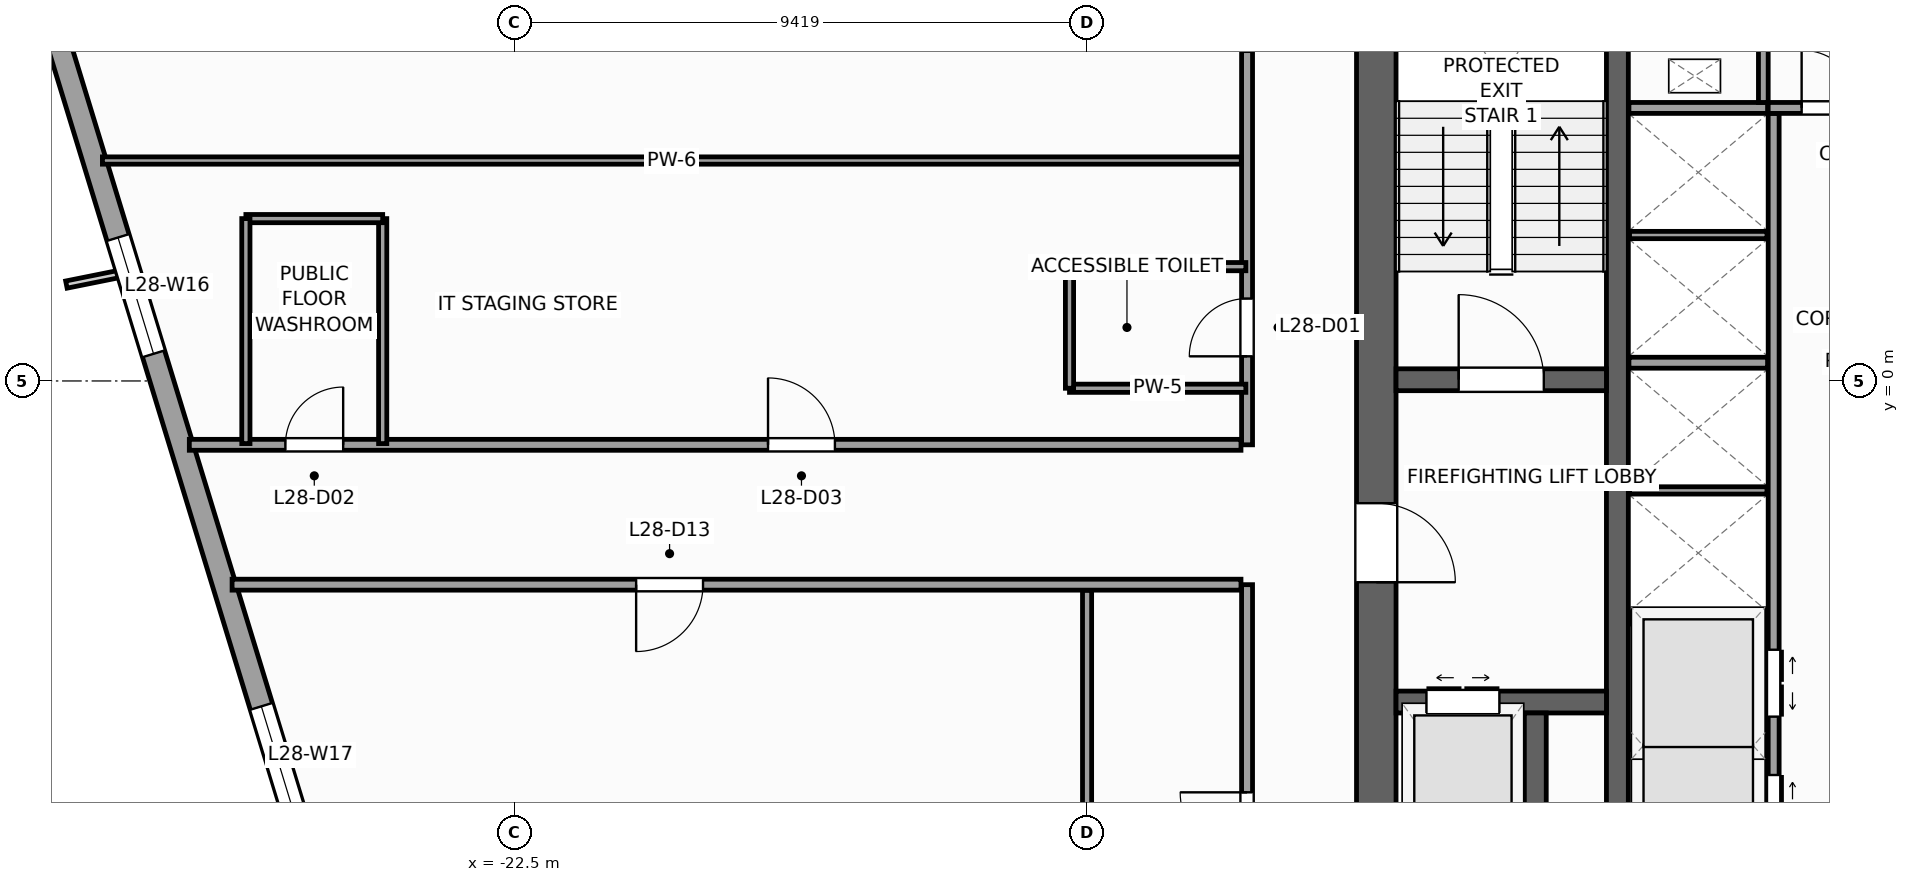
"""IFC4 building model, lengths in metres.
Left out: names, types, materials, properties, quantities, classifications, styles, units other than length and angle.
Written with IfcOpenShell. Run it as: python <this file> out.ifc"""

import sys

from ifc_helpers import new_model, si_unit, direction, frame, frame_2d, origin, place, context, subcontext, project, spatial, rectangle, extrude, source, transform, mapped, element, fill, save


model = new_model("IFC4")
c1 = context("Model", 3, precision=1e-05, world=origin(), true_north=direction((0.0, 1.0)))
c2 = subcontext(c1, "Body", "Model", "MODEL_VIEW")
j1 = project(units=[si_unit("LENGTHUNIT", "METRE"), si_unit("PLANEANGLEUNIT", "RADIAN")], contexts=[c1])
p1 = place(None, origin())
s1 = spatial("IfcSite", under=j1, at=p1, CompositionType="ELEMENT")
p2 = place(p1, origin())
s2 = spatial("IfcBuilding", under=s1, at=p2, CompositionType="ELEMENT")
p3 = place(p2, frame((0.0, 0.0, 119.2)))
s3 = spatial("IfcBuildingStorey", under=s2, at=p3, CompositionType="ELEMENT", Elevation=119.2)
p4 = place(p3, frame((-8.325, -8.0, 0.0), z_axis=(0.0, 0.0, 1.0), x_axis=(0.0, 1.0, 0.0)))
e1 = element("IfcWall", 1, at=p4, inside=s3, PredefinedType="SHEAR", context=c2, shape_type="SweptSolid", body=[
    extrude(rectangle(XDim=16.0, YDim=0.65, at=frame_2d((8.0, 0.0))), origin(), (0.0, 0.0, 1.0), 4.0),
])
p5 = place(p4, frame((4.69, 0.0, 0.0)))
e2 = element("IfcOpeningElement", 2, at=p5, cuts=e1, PredefinedType="OPENING", context=c2, shape_type="SweptSolid", body=[
    extrude(rectangle(XDim=1.3, YDim=2.2, at=frame_2d((0.65, 1.1))), frame((0.0, 0.335, 0.0), z_axis=(0.0, -1.0, 0.0), x_axis=(1.0, 0.0, 0.0)), (0.0, 0.0, 1.0), 0.67),
])
p6 = place(p3, frame((-4.36, -8.0, 0.0), z_axis=(0.0, 0.0, 1.0), x_axis=(0.0, 1.0, 0.0)))
e3 = element("IfcWall", 3, at=p6, inside=s3, PredefinedType="SHEAR", context=c2, shape_type="SweptSolid", body=[
    extrude(rectangle(XDim=16.0, YDim=0.36, at=frame_2d((8.0, 0.0))), origin(), (0.0, 0.0, 1.0), 4.0),
])
p7 = place(p3, frame((-8.0, 0.02, 0.0), z_axis=(0.0, 0.0, 1.0), x_axis=(1.0, 0.0, 0.0)))
e4 = element("IfcWall", 4, at=p7, inside=s3, PredefinedType="SHEAR", context=c2, shape_type="SweptSolid", body=[
    extrude(rectangle(XDim=3.46, YDim=0.36, at=frame_2d((1.73, 0.0))), origin(), (0.0, 0.0, 1.0), 4.0),
])
p8 = place(p7, frame((1.03, 0.0, 0.0)))
e5 = element("IfcOpeningElement", 5, at=p8, cuts=e4, PredefinedType="OPENING", context=c2, shape_type="SweptSolid", body=[
    extrude(rectangle(XDim=1.4, YDim=2.2, at=frame_2d((0.7, 1.1))), frame((0.0, 0.19, 0.0), z_axis=(0.0, -1.0, 0.0), x_axis=(1.0, 0.0, 0.0)), (0.0, 0.0, 1.0), 0.38),
])
p9 = place(p3, frame((-8.0, -5.28, 0.0), z_axis=(0.0, 0.0, 1.0), x_axis=(1.0, 0.0, 0.0)))
e6 = element("IfcWall", 6, at=p9, inside=s3, PredefinedType="SHEAR", context=c2, shape_type="SweptSolid", body=[
    extrude(rectangle(XDim=3.46, YDim=0.36, at=frame_2d((1.73, 0.0))), origin(), (0.0, 0.0, 1.0), 4.0),
])
p10 = place(p9, frame((0.5, 0.0, 0.0)))
e7 = element("IfcOpeningElement", 7, at=p10, cuts=e6, PredefinedType="OPENING", context=c2, shape_type="SweptSolid", body=[
    extrude(rectangle(XDim=1.2, YDim=2.25, at=frame_2d((0.6, 1.125))), frame((0.0, 0.19, 0.0), z_axis=(0.0, -1.0, 0.0), x_axis=(1.0, 0.0, 0.0)), (0.0, 0.0, 1.0), 0.38),
])
p11 = place(p3, frame((-5.71, -8.0, 0.0), z_axis=(0.0, 0.0, 1.0), x_axis=(0.0, 1.0, 0.0)))
e8 = element("IfcWall", 8, at=p11, inside=s3, PredefinedType="SHEAR", context=c2, shape_type="SweptSolid", body=[
    extrude(rectangle(XDim=2.54, YDim=0.36, at=frame_2d((1.27, 0.0))), origin(), (0.0, 0.0, 1.0), 4.0),
])
p12 = place(p3, frame((-32.658, 14.265, 0.0), z_axis=(0.0, 0.0, 1.0), x_axis=(0.292373127906, -0.956304320851, 0.0)))
e9 = element("IfcWall", 9, at=p12, inside=s3, PredefinedType="STANDARD", context=c2, shape_type="SweptSolid", body=[
    extrude(rectangle(XDim=46.38, YDim=0.38, at=frame_2d((23.19, 0.0))), origin(), (0.0, 0.0, 1.0), 3.14),
])
p13 = place(p12, frame((28.265, 0.0, 0.0)))
e10 = element("IfcOpeningElement", 10, at=p13, cuts=e9, PredefinedType="OPENING", context=c2, shape_type="SweptSolid", body=[
    extrude(rectangle(XDim=1.05, YDim=2.25, at=frame_2d((0.525, 1.125))), frame((0.0, 0.2, 0.0), z_axis=(0.0, -1.0, 0.0), x_axis=(1.0, 0.0, 0.0)), (0.0, 0.0, 1.0), 0.4),
])
p14 = place(p12, frame((4.865, 0.0, 0.51)))
e11 = element("IfcOpeningElement", 11, at=p14, cuts=e9, PredefinedType="OPENING", context=c2, shape_type="SweptSolid", body=[
    extrude(rectangle(XDim=1.4, YDim=2.4, at=frame_2d((0.7, 1.2))), frame((0.0, 0.2, 0.0), z_axis=(0.0, -1.0, 0.0), x_axis=(1.0, 0.0, 0.0)), (0.0, 0.0, 1.0), 0.4),
])
p15 = place(p12, frame((12.45, 0.0, 0.51)))
e12 = element("IfcOpeningElement", 12, at=p15, cuts=e9, PredefinedType="OPENING", context=c2, shape_type="SweptSolid", body=[
    extrude(rectangle(XDim=2.0, YDim=2.4, at=frame_2d((1.0, 1.2))), frame((0.0, 0.2, 0.0), z_axis=(0.0, -1.0, 0.0), x_axis=(1.0, 0.0, 0.0)), (0.0, 0.0, 1.0), 0.4),
])
p16 = place(p12, frame((20.512, 0.0, 0.51)))
e13 = element("IfcOpeningElement", 13, at=p16, cuts=e9, PredefinedType="OPENING", context=c2, shape_type="SweptSolid", body=[
    extrude(rectangle(XDim=2.0, YDim=2.4, at=frame_2d((1.0, 1.2))), frame((0.0, 0.2, 0.0), z_axis=(0.0, -1.0, 0.0), x_axis=(1.0, 0.0, 0.0)), (0.0, 0.0, 1.0), 0.4),
])
p17 = place(p12, frame((30.538, 0.0, 0.51)))
e14 = element("IfcOpeningElement", 14, at=p17, cuts=e9, PredefinedType="OPENING", context=c2, shape_type="SweptSolid", body=[
    extrude(rectangle(XDim=2.0, YDim=2.4, at=frame_2d((1.0, 1.2))), frame((0.0, 0.2, 0.0), z_axis=(0.0, -1.0, 0.0), x_axis=(1.0, 0.0, 0.0)), (0.0, 0.0, 1.0), 0.4),
])
p18 = place(p12, frame((39.187, 0.0, 0.51)))
e15 = element("IfcOpeningElement", 15, at=p18, cuts=e9, PredefinedType="OPENING", context=c2, shape_type="SweptSolid", body=[
    extrude(rectangle(XDim=1.4, YDim=2.4, at=frame_2d((0.7, 1.2))), frame((0.0, 0.2, 0.0), z_axis=(0.0, -1.0, 0.0), x_axis=(1.0, 0.0, 0.0)), (0.0, 0.0, 1.0), 0.4),
])
p19 = place(p3, frame((-1.79, -7.98, 0.0), z_axis=(0.0, 0.0, 1.0), x_axis=(0.0, 1.0, 0.0)))
e16 = element("IfcWall", 16, at=p19, inside=s3, PredefinedType="PARTITIONING", context=c2, shape_type="SweptSolid", body=[
    extrude(rectangle(XDim=12.38, YDim=0.18, at=frame_2d((6.19, 0.0))), origin(), (0.0, 0.0, 1.0), 3.74),
])
p20 = place(p19, frame((0.4, 0.0, 0.0)))
e17 = element("IfcOpeningElement", 17, at=p20, cuts=e16, PredefinedType="OPENING", context=c2, shape_type="SweptSolid", body=[
    extrude(rectangle(XDim=1.1, YDim=2.2, at=frame_2d((0.55, 1.1))), frame((0.0, 0.1, 0.0), z_axis=(0.0, -1.0, 0.0), x_axis=(1.0, 0.0, 0.0)), (0.0, 0.0, 1.0), 0.2),
])
p21 = place(p19, frame((2.46, 0.0, 0.0)))
e18 = element("IfcOpeningElement", 18, at=p21, cuts=e16, PredefinedType="OPENING", context=c2, shape_type="SweptSolid", body=[
    extrude(rectangle(XDim=1.1, YDim=2.2, at=frame_2d((0.55, 1.1))), frame((0.0, 0.1, 0.0), z_axis=(0.0, -1.0, 0.0), x_axis=(1.0, 0.0, 0.0)), (0.0, 0.0, 1.0), 0.2),
])
p22 = place(p3, frame((-1.88, 4.49, 0.0), z_axis=(0.0, 0.0, 1.0), x_axis=(1.0, 0.0, 0.0)))
e19 = element("IfcWall", 19, at=p22, inside=s3, PredefinedType="PARTITIONING", context=c2, shape_type="SweptSolid", body=[
    extrude(rectangle(XDim=3.76, YDim=0.18, at=frame_2d((1.88, 0.0))), origin(), (0.0, 0.0, 1.0), 3.74),
])
p23 = place(p22, frame((0.55, 0.0, 0.0)))
e20 = element("IfcOpeningElement", 20, at=p23, cuts=e19, PredefinedType="OPENING", context=c2, shape_type="SweptSolid", body=[
    extrude(rectangle(XDim=0.95, YDim=2.1, at=frame_2d((0.475, 1.05))), frame((0.0, 0.1, 0.0), z_axis=(0.0, -1.0, 0.0), x_axis=(1.0, 0.0, 0.0)), (0.0, 0.0, 1.0), 0.2),
])
p24 = place(p22, frame((2.56, 0.0, 0.0)))
e21 = element("IfcOpeningElement", 21, at=p24, cuts=e19, PredefinedType="OPENING", context=c2, shape_type="SweptSolid", body=[
    extrude(rectangle(XDim=0.88, YDim=2.1, at=frame_2d((0.44, 1.05))), frame((0.0, 0.1, 0.0), z_axis=(0.0, -1.0, 0.0), x_axis=(1.0, 0.0, 0.0)), (0.0, 0.0, 1.0), 0.2),
])
for number, where, z_axis, x_axis in (
    (22, (-4.17, -3.9, 0.0), (0.0, 0.0, 1.0), (1.0, 0.0, 0.0)),
    (23, (-4.17, 0.3, 0.0), (0.0, 0.0, 1.0), (1.0, 0.0, 0.0)),
    (24, (-4.17, 4.49, 0.0), (0.0, 0.0, 1.0), (1.0, 0.0, 0.0)),
):
    element("IfcWall", number, at=place(p3, frame(where, z_axis=z_axis, x_axis=x_axis)), inside=s3, PredefinedType="PARTITIONING", context=c2, shape_type="SweptSolid", body=[
        extrude(rectangle(XDim=2.28, YDim=0.18, at=frame_2d((1.14, 0.0))), origin(), (0.0, 0.0, 1.0), 3.74),
    ])
for number, where, z_axis, x_axis in (
    (25, (-4.16, -6.0, 0.0), (0.0, 0.0, 1.0), (1.0, 0.0, 0.0)),
    (26, (-4.16, -1.8, 0.0), (0.0, 0.0, 1.0), (1.0, 0.0, 0.0)),
    (27, (-4.16, 2.4, 0.0), (0.0, 0.0, 1.0), (1.0, 0.0, 0.0)),
):
    element("IfcWall", number, at=place(p3, frame(where, z_axis=z_axis, x_axis=x_axis)), inside=s3, PredefinedType="PARTITIONING", context=c2, shape_type="SweptSolid", body=[
        extrude(rectangle(XDim=2.26, YDim=0.12, at=frame_2d((1.13, 0.0))), origin(), (0.0, 0.0, 1.0), 3.74),
    ])
p25 = place(p3, frame((-1.96, 4.58, 0.0), z_axis=(0.0, 0.0, 1.0), x_axis=(0.0, 1.0, 0.0)))
e28 = element("IfcWall", 28, at=p25, inside=s3, PredefinedType="PARTITIONING", context=c2, shape_type="SweptSolid", body=[
    extrude(rectangle(XDim=3.4, YDim=0.16, at=frame_2d((1.7, 0.0))), origin(), (0.0, 0.0, 1.0), 3.74),
])
p26 = place(p3, frame((-10.45, -12.6, 0.0), z_axis=(0.0, 0.0, 1.0), x_axis=(0.0, 1.0, 0.0)))
e29 = element("IfcWall", 29, at=p26, inside=s3, PredefinedType="PARTITIONING", context=c2, shape_type="SweptSolid", body=[
    extrude(rectangle(XDim=9.25, YDim=0.18, at=frame_2d((4.625, 0.0))), origin(), (0.0, 0.0, 1.0), 3.74),
])
p27 = place(p26, frame((4.735, 0.0, 0.0)))
e30 = element("IfcOpeningElement", 30, at=p27, cuts=e29, PredefinedType="OPENING", context=c2, shape_type="SweptSolid", body=[
    extrude(rectangle(XDim=1.1, YDim=2.2, at=frame_2d((0.55, 1.1))), frame((0.0, 0.1, 0.0), z_axis=(0.0, -1.0, 0.0), x_axis=(1.0, 0.0, 0.0)), (0.0, 0.0, 1.0), 0.2),
])
p28 = place(p3, frame((-10.45, -1.05, 0.0), z_axis=(0.0, 0.0, 1.0), x_axis=(0.0, 1.0, 0.0)))
e31 = element("IfcWall", 31, at=p28, inside=s3, PredefinedType="PARTITIONING", context=c2, shape_type="SweptSolid", body=[
    extrude(rectangle(XDim=13.65, YDim=0.18, at=frame_2d((6.825, 0.0))), origin(), (0.0, 0.0, 1.0), 3.74),
])
p29 = place(p28, frame((1.455, 0.0, 0.0)))
e32 = element("IfcOpeningElement", 32, at=p29, cuts=e31, PredefinedType="OPENING", context=c2, shape_type="SweptSolid", body=[
    extrude(rectangle(XDim=0.95, YDim=2.1, at=frame_2d((0.475, 1.05))), frame((0.0, 0.1, 0.0), z_axis=(0.0, -1.0, 0.0), x_axis=(1.0, 0.0, 0.0)), (0.0, 0.0, 1.0), 0.2),
])
p30 = place(p28, frame((6.462, 0.0, 0.0)))
e33 = element("IfcOpeningElement", 33, at=p30, cuts=e31, PredefinedType="OPENING", context=c2, shape_type="SweptSolid", body=[
    extrude(rectangle(XDim=1.1, YDim=2.2, at=frame_2d((0.55, 1.1))), frame((0.0, 0.1, 0.0), z_axis=(0.0, -1.0, 0.0), x_axis=(1.0, 0.0, 0.0)), (0.0, 0.0, 1.0), 0.2),
])
p31 = place(p3, frame((-27.142, -3.35, 0.0), z_axis=(0.0, 0.0, 1.0), x_axis=(1.0, 0.0, 0.0)))
e34 = element("IfcWall", 34, at=p31, inside=s3, PredefinedType="PARTITIONING", context=c2, shape_type="SweptSolid", body=[
    extrude(rectangle(XDim=16.592, YDim=0.18, at=frame_2d((8.296, 0.0))), origin(), (0.0, 0.0, 1.0), 3.74),
])
p32 = place(p31, frame((6.645, 0.0, 0.0)))
e35 = element("IfcOpeningElement", 35, at=p32, cuts=e34, PredefinedType="OPENING", context=c2, shape_type="SweptSolid", body=[
    extrude(rectangle(XDim=1.1, YDim=2.2, at=frame_2d((0.55, 1.1))), frame((0.0, 0.1, 0.0), z_axis=(0.0, -1.0, 0.0), x_axis=(1.0, 0.0, 0.0)), (0.0, 0.0, 1.0), 0.2),
])
p33 = place(p3, frame((-27.845, -1.05, 0.0), z_axis=(0.0, 0.0, 1.0), x_axis=(1.0, 0.0, 0.0)))
e36 = element("IfcWall", 36, at=p33, inside=s3, PredefinedType="PARTITIONING", context=c2, shape_type="SweptSolid", body=[
    extrude(rectangle(XDim=17.295, YDim=0.18, at=frame_2d((8.647, 0.0))), origin(), (0.0, 0.0, 1.0), 3.74),
])
p34 = place(p33, frame((1.58, 0.0, 0.0)))
e37 = element("IfcOpeningElement", 37, at=p34, cuts=e36, PredefinedType="OPENING", context=c2, shape_type="SweptSolid", body=[
    extrude(rectangle(XDim=0.95, YDim=2.1, at=frame_2d((0.475, 1.05))), frame((0.0, 0.1, 0.0), z_axis=(0.0, -1.0, 0.0), x_axis=(1.0, 0.0, 0.0)), (0.0, 0.0, 1.0), 0.2),
])
p35 = place(p33, frame((9.517, 0.0, 0.0)))
e38 = element("IfcOpeningElement", 38, at=p35, cuts=e36, PredefinedType="OPENING", context=c2, shape_type="SweptSolid", body=[
    extrude(rectangle(XDim=1.1, YDim=2.2, at=frame_2d((0.55, 1.1))), frame((0.0, 0.1, 0.0), z_axis=(0.0, -1.0, 0.0), x_axis=(1.0, 0.0, 0.0)), (0.0, 0.0, 1.0), 0.2),
])
p36 = place(p3, frame((-29.274, 3.625, 0.0), z_axis=(0.0, 0.0, 1.0), x_axis=(1.0, 0.0, 0.0)))
e39 = element("IfcWall", 39, at=p36, inside=s3, PredefinedType="PARTITIONING", context=c2, shape_type="SweptSolid", body=[
    extrude(rectangle(XDim=18.729, YDim=0.12, at=frame_2d((9.365, 0.0))), origin(), (0.0, 0.0, 1.0), 3.74),
])
p37 = place(p3, frame((-13.081, -32.165, 0.0), z_axis=(0.0, 0.0, 1.0), x_axis=(0.0, 1.0, 0.0)))
e40 = element("IfcWall", 40, at=p37, inside=s3, PredefinedType="PARTITIONING", context=c2, shape_type="SweptSolid", body=[
    extrude(rectangle(XDim=28.72, YDim=0.15, at=frame_2d((14.36, 0.0))), origin(), (0.0, 0.0, 1.0), 2.732),
])
for number, where, z_axis, x_axis in (
    (41, (-13.37, -0.12, 0.0), (0.0, 0.0, 1.0), (1.0, 0.0, 0.0)),
    (42, (-13.37, 1.88, 0.0), (0.0, 0.0, 1.0), (1.0, 0.0, 0.0)),
):
    element("IfcWall", number, at=place(p3, frame(where, z_axis=z_axis, x_axis=x_axis)), inside=s3, PredefinedType="PARTITIONING", context=c2, shape_type="SweptSolid", body=[
        extrude(rectangle(XDim=2.9, YDim=0.135, at=frame_2d((1.45, 0.0))), origin(), (0.0, 0.0, 1.0), 3.74),
    ])
p38 = place(p3, frame((-13.37, -0.12, 0.0), z_axis=(0.0, 0.0, 1.0), x_axis=(0.0, 1.0, 0.0)))
e43 = element("IfcWall", 43, at=p38, inside=s3, PredefinedType="PARTITIONING", context=c2, shape_type="SweptSolid", body=[
    extrude(rectangle(XDim=2.0, YDim=0.135, at=frame_2d((1.0, 0.0))), origin(), (0.0, 0.0, 1.0), 2.732),
])
p39 = place(p3, frame((-24.665, -1.03, 0.0), z_axis=(0.0, 0.0, 1.0), x_axis=(0.0, 1.0, 0.0)))
e44 = element("IfcWall", 44, at=p39, inside=s3, PredefinedType="PARTITIONING", context=c2, shape_type="SweptSolid", body=[
    extrude(rectangle(XDim=3.7, YDim=0.135, at=frame_2d((1.85, 0.0))), origin(), (0.0, 0.0, 1.0), 3.74),
])
p40 = place(p3, frame((-26.915, 2.67, 0.0), z_axis=(0.0, 0.0, 1.0), x_axis=(1.0, 0.0, 0.0)))
e45 = element("IfcWall", 45, at=p40, inside=s3, PredefinedType="PARTITIONING", context=c2, shape_type="SweptSolid", body=[
    extrude(rectangle(XDim=2.25, YDim=0.135, at=frame_2d((1.125, 0.0))), origin(), (0.0, 0.0, 1.0), 3.74),
])
p41 = place(p3, frame((-26.915, -1.03, 0.0), z_axis=(0.0, 0.0, 1.0), x_axis=(0.0, 1.0, 0.0)))
e46 = element("IfcWall", 46, at=p41, inside=s3, PredefinedType="PARTITIONING", context=c2, shape_type="SweptSolid", body=[
    extrude(rectangle(XDim=3.7, YDim=0.135, at=frame_2d((1.85, 0.0))), origin(), (0.0, 0.0, 1.0), 3.74),
])
m1 = source(origin(), c2, "Body", "SweptSolid", [
    extrude(rectangle(XDim=2.0, YDim=2.4, at=frame_2d((1.0, 1.2))), frame((0.0, 0.03, 0.0), z_axis=(0.0, -1.0, 0.0), x_axis=(1.0, 0.0, 0.0)), (0.0, 0.0, 1.0), 0.06),
])
p42 = place(p15, origin())
e47 = element("IfcWindow", 47, at=p42, inside=s3, PartitioningType="SINGLE_PANEL", PredefinedType="WINDOW", context=c2, shape_type="MappedRepresentation", body=[
    mapped(m1, transform((0.0, 0.0, 0.0), scale=1.0)),
])
fill(e12, e47)
p43 = place(p16, origin())
e48 = element("IfcWindow", 48, at=p43, inside=s3, PartitioningType="SINGLE_PANEL", PredefinedType="WINDOW", context=c2, shape_type="MappedRepresentation", body=[
    mapped(m1, transform((0.0, 0.0, 0.0), scale=1.0)),
])
fill(e13, e48)
m2 = source(origin(), c2, "Body", "SweptSolid", [
    extrude(rectangle(XDim=1.4, YDim=2.2, at=frame_2d((0.7, 1.1))), frame((0.0, 0.025, 0.0), z_axis=(0.0, -1.0, 0.0), x_axis=(1.0, 0.0, 0.0)), (0.0, 0.0, 1.0), 0.05),
])
p44 = place(p8, origin())
e49 = element("IfcDoor", 49, at=p44, inside=s3, OperationType="SINGLE_SWING_LEFT", PredefinedType="DOOR", context=c2, shape_type="MappedRepresentation", body=[
    mapped(m2, transform((0.0, 0.0, 0.0), scale=1.0)),
])
fill(e5, e49)
m3 = source(origin(), c2, "Body", "SweptSolid", [
    extrude(rectangle(XDim=1.3, YDim=2.2, at=frame_2d((0.65, 1.1))), frame((0.0, 0.025, 0.0), z_axis=(0.0, -1.0, 0.0), x_axis=(1.0, 0.0, 0.0)), (0.0, 0.0, 1.0), 0.05),
])
p45 = place(p5, frame((1.3, 0.0, 0.0), z_axis=(0.0, 0.0, 1.0), x_axis=(-1.0, 0.0, 0.0)))
e50 = element("IfcDoor", 50, at=p45, inside=s3, OperationType="SINGLE_SWING_LEFT", PredefinedType="DOOR", context=c2, shape_type="MappedRepresentation", body=[
    mapped(m3, transform((0.0, 0.0, 0.0), scale=1.0)),
])
fill(e2, e50)
m4 = source(origin(), c2, "Body", "SweptSolid", [
    extrude(rectangle(XDim=1.2, YDim=2.25, at=frame_2d((0.6, 1.125))), frame((0.0, 0.025, 0.0), z_axis=(0.0, -1.0, 0.0), x_axis=(1.0, 0.0, 0.0)), (0.0, 0.0, 1.0), 0.05),
])
p46 = place(p10, origin())
e51 = element("IfcDoor", 51, at=p46, inside=s3, OperationType="DOUBLE_DOOR_SLIDING", PredefinedType="DOOR", context=c2, shape_type="MappedRepresentation", body=[
    mapped(m4, transform((0.0, 0.0, 0.0), scale=1.0)),
])
fill(e7, e51)
m5 = source(origin(), c2, "Body", "SweptSolid", [
    extrude(rectangle(XDim=1.1, YDim=2.2, at=frame_2d((0.55, 1.1))), frame((0.0, 0.025, 0.0), z_axis=(0.0, -1.0, 0.0), x_axis=(1.0, 0.0, 0.0)), (0.0, 0.0, 1.0), 0.05),
])
p47 = place(p20, frame((1.1, 0.0, 0.0), z_axis=(0.0, 0.0, 1.0), x_axis=(-1.0, 0.0, 0.0)))
e52 = element("IfcDoor", 52, at=p47, inside=s3, OperationType="DOUBLE_DOOR_SLIDING", PredefinedType="DOOR", context=c2, shape_type="MappedRepresentation", body=[
    mapped(m5, transform((0.0, 0.0, 0.0), scale=1.0)),
])
fill(e17, e52)
p48 = place(p21, frame((1.1, 0.0, 0.0), z_axis=(0.0, 0.0, 1.0), x_axis=(-1.0, 0.0, 0.0)))
e53 = element("IfcDoor", 53, at=p48, inside=s3, OperationType="DOUBLE_DOOR_SLIDING", PredefinedType="DOOR", context=c2, shape_type="MappedRepresentation", body=[
    mapped(m5, transform((0.0, 0.0, 0.0), scale=1.0)),
])
fill(e18, e53)
m6 = source(origin(), c2, "Body", "SweptSolid", [
    extrude(rectangle(XDim=0.95, YDim=2.1, at=frame_2d((0.475, 1.05))), frame((0.0, 0.025, 0.0), z_axis=(0.0, -1.0, 0.0), x_axis=(1.0, 0.0, 0.0)), (0.0, 0.0, 1.0), 0.05),
])
p49 = place(p23, origin())
e54 = element("IfcDoor", 54, at=p49, inside=s3, OperationType="SINGLE_SWING_LEFT", PredefinedType="DOOR", context=c2, shape_type="MappedRepresentation", body=[
    mapped(m6, transform((0.0, 0.0, 0.0), scale=1.0)),
])
fill(e20, e54)
p50 = place(p29, origin())
e55 = element("IfcDoor", 55, at=p50, inside=s3, OperationType="SINGLE_SWING_LEFT", PredefinedType="DOOR", context=c2, shape_type="MappedRepresentation", body=[
    mapped(m6, transform((0.0, 0.0, 0.0), scale=1.0)),
])
fill(e32, e55)
p51 = place(p34, origin())
e56 = element("IfcDoor", 56, at=p51, inside=s3, OperationType="SINGLE_SWING_RIGHT", PredefinedType="DOOR", context=c2, shape_type="MappedRepresentation", body=[
    mapped(m6, transform((0.0, 0.0, 0.0), scale=1.0)),
])
fill(e37, e56)
p52 = place(p35, origin())
e57 = element("IfcDoor", 57, at=p52, inside=s3, OperationType="SINGLE_SWING_LEFT", PredefinedType="DOOR", context=c2, shape_type="MappedRepresentation", body=[
    mapped(m5, transform((0.0, 0.0, 0.0), scale=1.0)),
])
fill(e38, e57)
p53 = place(p32, frame((1.1, 0.0, 0.0), z_axis=(0.0, 0.0, 1.0), x_axis=(-1.0, 0.0, 0.0)))
e58 = element("IfcDoor", 58, at=p53, inside=s3, OperationType="SINGLE_SWING_LEFT", PredefinedType="DOOR", context=c2, shape_type="MappedRepresentation", body=[
    mapped(m5, transform((0.0, 0.0, 0.0), scale=1.0)),
])
fill(e35, e58)
p54 = place(p27, origin())
e59 = element("IfcDoor", 59, at=p54, inside=s3, OperationType="SINGLE_SWING_RIGHT", PredefinedType="DOOR", context=c2, shape_type="MappedRepresentation", body=[
    mapped(m5, transform((0.0, 0.0, 0.0), scale=1.0)),
])
fill(e30, e59)
save(model, sys.argv[1])
